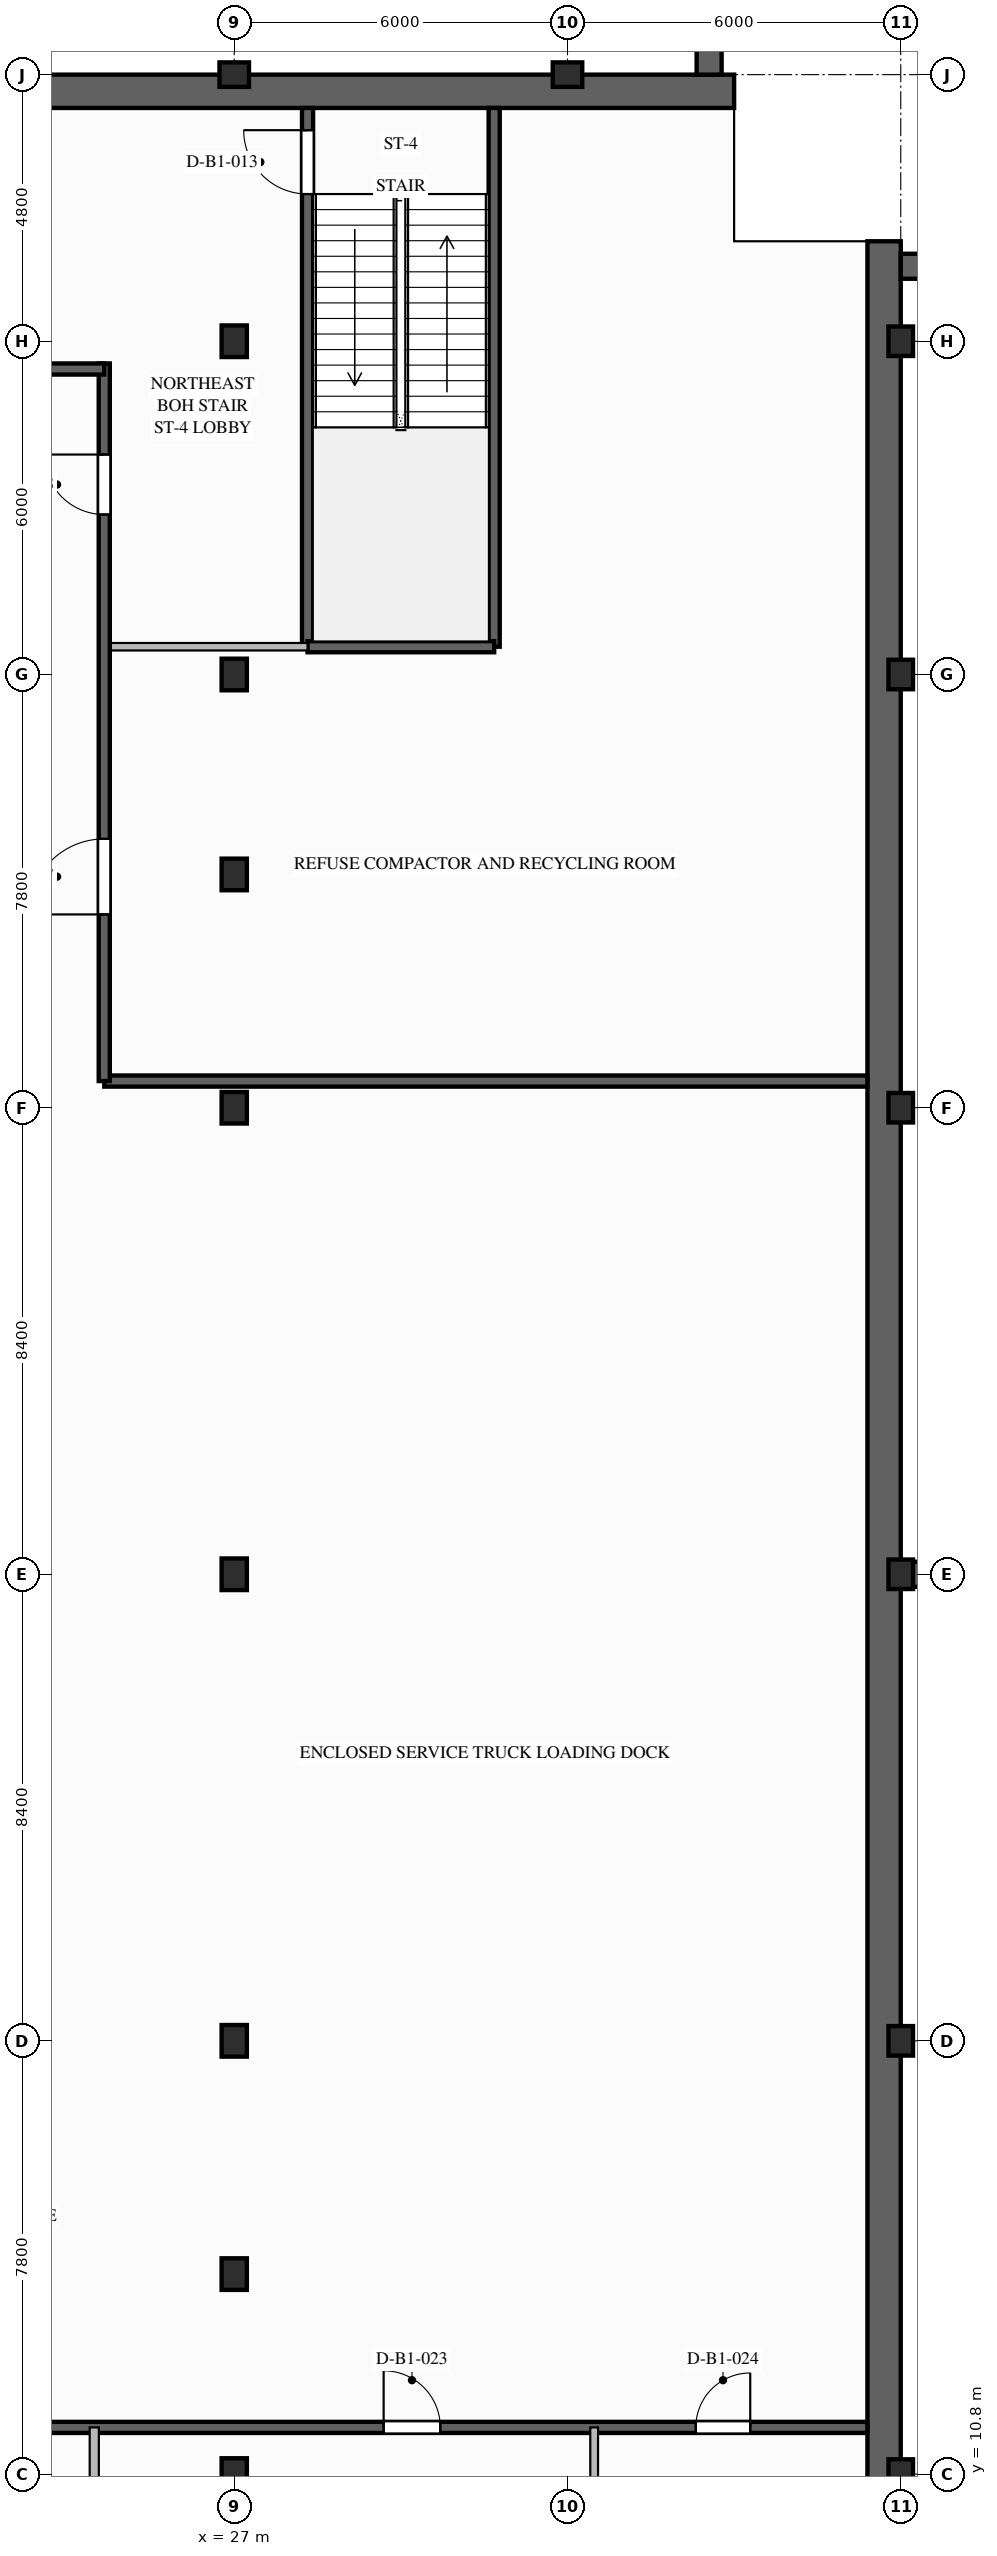
"""IFC4 building model, lengths in metres.
Left out: names, types, materials, properties, quantities, classifications, styles, units other than length and angle.
Written with IfcOpenShell. Run it as: python <this file> out.ifc"""

import sys

from ifc_helpers import new_model, si_unit, direction, frame, frame_2d, origin, origin_2d, place, context, subcontext, project, spatial, rectangle, i_section, extrude, element, fill, save


model = new_model("IFC4")
c1 = context("Model", 3, precision=1e-05, world=origin(), true_north=direction((0.0, 1.0)))
c2 = subcontext(c1, "Body", "Model", "MODEL_VIEW")
j1 = project(units=[si_unit("LENGTHUNIT", "METRE"), si_unit("PLANEANGLEUNIT", "RADIAN")], contexts=[c1])
p1 = place(None, origin())
s1 = spatial("IfcSite", under=j1, at=p1, CompositionType="ELEMENT")
p2 = place(p1, origin())
s2 = spatial("IfcBuilding", under=s1, at=p2, CompositionType="ELEMENT")
p3 = place(p2, frame((0.0, 0.0, -5.4)))
s3 = spatial("IfcBuildingStorey", under=s2, at=p3, CompositionType="ELEMENT", Elevation=-5.4)
p4 = place(p3, frame((-24.0, 53.7, 0.0), z_axis=(0.0, 0.0, 1.0), x_axis=(1.0, 0.0, 0.0)))
e1 = element("IfcWall", 1, at=p4, inside=s3, PredefinedType="USERDEFINED", context=c2, shape_type="SweptSolid", body=[
    extrude(rectangle(XDim=60.0, YDim=0.6, at=frame_2d((30.0, 0.0))), origin(), (0.0, 0.0, 1.0), 5.05),
])
p5 = place(p3, frame((38.7, 51.0, 0.0), z_axis=(0.0, 0.0, 1.0), x_axis=(0.0, -1.0, 0.0)))
e2 = element("IfcWall", 2, at=p5, inside=s3, PredefinedType="USERDEFINED", context=c2, shape_type="SweptSolid", body=[
    extrude(rectangle(XDim=48.0, YDim=0.6, at=frame_2d((24.0, 0.0))), origin(), (0.0, 0.0, 1.0), 5.05),
])
for number, where, z_axis, x_axis in (
    (3, (39.0, 10.8, 0.0), (0.0, 0.0, 1.0), (1.0, 0.0, 0.0)),
    (4, (39.0, 18.6, 0.0), (0.0, 0.0, 1.0), (1.0, 0.0, 0.0)),
    (5, (39.0, 27.0, 0.0), (0.0, 0.0, 1.0), (1.0, 0.0, 0.0)),
    (6, (39.0, 35.4, 0.0), (0.0, 0.0, 1.0), (1.0, 0.0, 0.0)),
    (7, (39.0, 43.2, 0.0), (0.0, 0.0, 1.0), (1.0, 0.0, 0.0)),
    (8, (39.0, 49.2, 0.0), (0.0, 0.0, 1.0), (1.0, 0.0, 0.0)),
    (9, (27.0, 54.0, 0.0), (0.0, 0.0, 1.0), (0.0, 1.0, 0.0)),
    (10, (33.0, 54.0, 0.0), (0.0, 0.0, 1.0), (0.0, 1.0, 0.0)),
):
    element("IfcColumn", number, at=place(p3, frame(where, z_axis=z_axis, x_axis=x_axis)), inside=s3, PredefinedType="COLUMN", context=c2, shape_type="SweptSolid", body=[
        extrude(i_section(OverallWidth=0.442, OverallDepth=0.531, WebThickness=0.066, FlangeThickness=0.106, FilletRadius=0.03, at=origin_2d()), origin(), (0.0, 0.0, 1.0), 5.4),
    ])
for number, where, z_axis, x_axis in (
    (11, (27.0, 10.8, 0.0), (0.0, 0.0, 1.0), (1.0, 0.0, 0.0)),
    (12, (27.0, 14.4, 0.0), (0.0, 0.0, 1.0), (1.0, 0.0, 0.0)),
    (13, (27.0, 39.6, 0.0), (0.0, 0.0, 1.0), (1.0, 0.0, 0.0)),
    (14, (27.0, 43.2, 0.0), (0.0, 0.0, 1.0), (1.0, 0.0, 0.0)),
    (15, (27.0, 49.2, 0.0), (0.0, 0.0, 1.0), (1.0, 0.0, 0.0)),
    (16, (27.0, 18.6, 0.0), (0.0, 0.0, 1.0), (1.0, 0.0, 0.0)),
    (17, (27.0, 27.0, 0.0), (0.0, 0.0, 1.0), (1.0, 0.0, 0.0)),
    (18, (27.0, 35.4, 0.0), (0.0, 0.0, 1.0), (1.0, 0.0, 0.0)),
):
    element("IfcColumn", number, at=place(p3, frame(where, z_axis=z_axis, x_axis=x_axis)), inside=s3, PredefinedType="COLUMN", context=c2, shape_type="SweptSolid", body=[
        extrude(i_section(OverallWidth=0.454, OverallDepth=0.569, WebThickness=0.078, FlangeThickness=0.125, FilletRadius=0.03, at=origin_2d()), origin(), (0.0, 0.0, 1.0), 5.4),
    ])
for number, where, z_axis, x_axis in (
    (19, (39.0, 27.0, -5.4), (0.0, 0.0, 1.0), (1.0, 0.0, 0.0)),
    (20, (39.0, 50.55, -5.4), (0.0, 0.0, 1.0), (1.0, 0.0, 0.0)),
):
    element("IfcWall", number, at=place(p3, frame(where, z_axis=z_axis, x_axis=x_axis)), inside=s3, PredefinedType="USERDEFINED", context=c2, shape_type="SweptSolid", body=[
        extrude(rectangle(XDim=5.825, YDim=0.45, at=frame_2d((2.913, 0.0))), origin(), (0.0, 0.0, 1.0), 10.62),
    ])
p6 = place(p3, frame((35.55, 54.0, -5.4), z_axis=(0.0, 0.0, 1.0), x_axis=(0.0, 1.0, 0.0)))
e21 = element("IfcWall", 21, at=p6, inside=s3, PredefinedType="USERDEFINED", context=c2, shape_type="SweptSolid", body=[
    extrude(rectangle(XDim=2.325, YDim=0.45, at=frame_2d((1.163, 0.0))), origin(), (0.0, 0.0, 1.0), 10.62),
])
p7 = place(p3, frame((28.32, 43.7, 0.0), z_axis=(0.0, 0.0, 1.0), x_axis=(0.0, 1.0, 0.0)))
e22 = element("IfcWall", 22, at=p7, inside=s3, PredefinedType="SOLIDWALL", context=c2, shape_type="SweptSolid", body=[
    extrude(rectangle(XDim=9.7, YDim=0.2, at=frame_2d((4.85, 0.0))), origin(), (0.0, 0.0, 1.0), 5.05),
])
p8 = place(p7, frame((8.15, 0.0, 0.0)))
e23 = element("IfcOpeningElement", 23, at=p8, cuts=e22, PredefinedType="OPENING", context=c2, shape_type="SweptSolid", body=[
    extrude(rectangle(XDim=1.15, YDim=2.15, at=frame_2d((0.575, 1.075))), frame((0.0, 0.11, 0.0), z_axis=(0.0, -1.0, 0.0), x_axis=(1.0, 0.0, 0.0)), (0.0, 0.0, 1.0), 0.22),
])
p9 = place(p3, frame((31.68, 53.4, 0.0), z_axis=(0.0, 0.0, 1.0), x_axis=(0.0, -1.0, 0.0)))
e24 = element("IfcWall", 24, at=p9, inside=s3, PredefinedType="SOLIDWALL", context=c2, shape_type="SweptSolid", body=[
    extrude(rectangle(XDim=9.7, YDim=0.2, at=frame_2d((4.85, 0.0))), origin(), (0.0, 0.0, 1.0), 5.05),
])
p10 = place(p3, frame((28.32, 43.7, 0.0), z_axis=(0.0, 0.0, 1.0), x_axis=(1.0, 0.0, 0.0)))
e25 = element("IfcWall", 25, at=p10, inside=s3, PredefinedType="SOLIDWALL", context=c2, shape_type="SweptSolid", body=[
    extrude(rectangle(XDim=3.36, YDim=0.2, at=frame_2d((1.68, 0.0))), origin(), (0.0, 0.0, 1.0), 5.05),
])
p11 = place(p3, frame((-21.1, 11.64, 0.0), z_axis=(0.0, 0.0, 1.0), x_axis=(1.0, 0.0, 0.0)))
e26 = element("IfcWall", 26, at=p11, inside=s3, PredefinedType="SOLIDWALL", context=c2, shape_type="SweptSolid", body=[
    extrude(rectangle(XDim=59.5, YDim=0.2, at=frame_2d((29.75, 0.0))), origin(), (0.0, 0.0, 1.0), 5.05),
])
p12 = place(p11, frame((6.36, 0.0, 0.0)))
e27 = element("IfcOpeningElement", 27, at=p12, cuts=e26, PredefinedType="OPENING", context=c2, shape_type="SweptSolid", body=[
    extrude(rectangle(XDim=1.08, YDim=2.04, at=frame_2d((0.54, 1.02))), frame((0.0, 0.11, 0.0), z_axis=(0.0, -1.0, 0.0), x_axis=(1.0, 0.0, 0.0)), (0.0, 0.0, 1.0), 0.22),
])
p13 = place(p11, frame((18.42, 0.0, 0.0)))
e28 = element("IfcOpeningElement", 28, at=p13, cuts=e26, PredefinedType="OPENING", context=c2, shape_type="SweptSolid", body=[
    extrude(rectangle(XDim=1.36, YDim=2.2, at=frame_2d((0.68, 1.1))), frame((0.0, 0.11, 0.0), z_axis=(0.0, -1.0, 0.0), x_axis=(1.0, 0.0, 0.0)), (0.0, 0.0, 1.0), 0.22),
])
p14 = place(p11, frame((32.72, 0.0, 0.0)))
e29 = element("IfcOpeningElement", 29, at=p14, cuts=e26, PredefinedType="OPENING", context=c2, shape_type="SweptSolid", body=[
    extrude(rectangle(XDim=1.36, YDim=2.2, at=frame_2d((0.68, 1.1))), frame((0.0, 0.11, 0.0), z_axis=(0.0, -1.0, 0.0), x_axis=(1.0, 0.0, 0.0)), (0.0, 0.0, 1.0), 0.22),
])
p15 = place(p11, frame((50.79, 0.0, 0.0)))
e30 = element("IfcOpeningElement", 30, at=p15, cuts=e26, PredefinedType="OPENING", context=c2, shape_type="SweptSolid", body=[
    extrude(rectangle(XDim=1.02, YDim=2.15, at=frame_2d((0.51, 1.075))), frame((0.0, 0.11, 0.0), z_axis=(0.0, -1.0, 0.0), x_axis=(1.0, 0.0, 0.0)), (0.0, 0.0, 1.0), 0.22),
])
p16 = place(p11, frame((56.41, 0.0, 0.0)))
e31 = element("IfcOpeningElement", 31, at=p16, cuts=e26, PredefinedType="OPENING", context=c2, shape_type="SweptSolid", body=[
    extrude(rectangle(XDim=0.98, YDim=2.1, at=frame_2d((0.49, 1.05))), frame((0.0, 0.11, 0.0), z_axis=(0.0, -1.0, 0.0), x_axis=(1.0, 0.0, 0.0)), (0.0, 0.0, 1.0), 0.22),
])
p17 = place(p3, frame((24.48, 0.6, 0.0), z_axis=(0.0, 0.0, 1.0), x_axis=(0.0, 1.0, 0.0)))
e32 = element("IfcWall", 32, at=p17, inside=s3, PredefinedType="PARTITIONING", context=c2, shape_type="SweptSolid", body=[
    extrude(rectangle(XDim=11.04, YDim=0.165, at=frame_2d((5.52, 0.0))), origin(), (0.0, 0.0, 1.0), 5.05),
])
p18 = place(p3, frame((33.48, 0.6, 0.0), z_axis=(0.0, 0.0, 1.0), x_axis=(0.0, 1.0, 0.0)))
e33 = element("IfcWall", 33, at=p18, inside=s3, PredefinedType="PLUMBINGWALL", context=c2, shape_type="SweptSolid", body=[
    extrude(rectangle(XDim=11.04, YDim=0.14, at=frame_2d((5.52, 0.0))), origin(), (0.0, 0.0, 1.0), 5.05),
])
p19 = place(p18, frame((2.2, 0.0, 0.0)))
e34 = element("IfcOpeningElement", 34, at=p19, cuts=e33, PredefinedType="OPENING", context=c2, shape_type="SweptSolid", body=[
    extrude(rectangle(XDim=0.92, YDim=2.1, at=frame_2d((0.46, 1.05))), frame((0.0, 0.08, 0.0), z_axis=(0.0, -1.0, 0.0), x_axis=(1.0, 0.0, 0.0)), (0.0, 0.0, 1.0), 0.16),
])
p20 = place(p3, frame((24.66, 35.88, 0.0), z_axis=(0.0, 0.0, 1.0), x_axis=(1.0, 0.0, 0.0)))
e35 = element("IfcWall", 35, at=p20, inside=s3, PredefinedType="SOLIDWALL", context=c2, shape_type="SweptSolid", body=[
    extrude(rectangle(XDim=13.74, YDim=0.2, at=frame_2d((6.87, 0.0))), origin(), (0.0, 0.0, 1.0), 5.05),
])
p21 = place(p3, frame((24.66, 43.7, 0.0), z_axis=(0.0, 0.0, 1.0), x_axis=(1.0, 0.0, 0.0)))
e36 = element("IfcWall", 36, at=p21, inside=s3, PredefinedType="PARTITIONING", context=c2, shape_type="SweptSolid", body=[
    extrude(rectangle(XDim=3.66, YDim=0.135, at=frame_2d((1.83, 0.0))), origin(), (0.0, 0.0, 1.0), 5.05),
])
p22 = place(p3, frame((24.66, 35.88, 0.0), z_axis=(0.0, 0.0, 1.0), x_axis=(0.0, 1.0, 0.0)))
e37 = element("IfcWall", 37, at=p22, inside=s3, PredefinedType="SOLIDWALL", context=c2, shape_type="SweptSolid", body=[
    extrude(rectangle(XDim=12.92, YDim=0.2, at=frame_2d((6.46, 0.0))), origin(), (0.0, 0.0, 1.0), 5.05),
])
p23 = place(p22, frame((3.0, 0.0, 0.0)))
e38 = element("IfcOpeningElement", 38, at=p23, cuts=e37, PredefinedType="OPENING", context=c2, shape_type="SweptSolid", body=[
    extrude(rectangle(XDim=1.36, YDim=2.2, at=frame_2d((0.68, 1.1))), frame((0.0, 0.11, 0.0), z_axis=(0.0, -1.0, 0.0), x_axis=(1.0, 0.0, 0.0)), (0.0, 0.0, 1.0), 0.22),
])
p24 = place(p22, frame((10.2, 0.0, 0.0)))
e39 = element("IfcOpeningElement", 39, at=p24, cuts=e37, PredefinedType="OPENING", context=c2, shape_type="SweptSolid", body=[
    extrude(rectangle(XDim=1.08, YDim=2.04, at=frame_2d((0.54, 1.02))), frame((0.0, 0.11, 0.0), z_axis=(0.0, -1.0, 0.0), x_axis=(1.0, 0.0, 0.0)), (0.0, 0.0, 1.0), 0.22),
])
p25 = place(p3, frame((-26.4, 48.7, 0.0), z_axis=(0.0, 0.0, 1.0), x_axis=(1.0, 0.0, 0.0)))
e40 = element("IfcWall", 40, at=p25, inside=s3, PredefinedType="SOLIDWALL", context=c2, shape_type="SweptSolid", body=[
    extrude(rectangle(XDim=51.06, YDim=0.2, at=frame_2d((25.53, 0.0))), origin(), (0.0, 0.0, 1.0), 5.05),
])
p26 = place(p8, origin())
e41 = element("IfcDoor", 41, at=p26, inside=s3, OperationType="SINGLE_SWING_RIGHT", PredefinedType="DOOR", context=c2, shape_type="SweptSolid", body=[
    extrude(rectangle(XDim=1.15, YDim=2.15, at=frame_2d((0.575, 1.075))), frame((0.0, 0.025, 0.0), z_axis=(0.0, -1.0, 0.0), x_axis=(1.0, 0.0, 0.0)), (0.0, 0.0, 1.0), 0.05),
])
fill(e23, e41)
p27 = place(p15, origin())
e42 = element("IfcDoor", 42, at=p27, inside=s3, OperationType="SINGLE_SWING_LEFT", PredefinedType="DOOR", context=c2, shape_type="SweptSolid", body=[
    extrude(rectangle(XDim=1.02, YDim=2.15, at=frame_2d((0.51, 1.075))), frame((0.0, 0.025, 0.0), z_axis=(0.0, -1.0, 0.0), x_axis=(1.0, 0.0, 0.0)), (0.0, 0.0, 1.0), 0.05),
])
fill(e30, e42)
p28 = place(p16, origin())
e43 = element("IfcDoor", 43, at=p28, inside=s3, OperationType="SINGLE_SWING_RIGHT", PredefinedType="DOOR", context=c2, shape_type="SweptSolid", body=[
    extrude(rectangle(XDim=0.98, YDim=2.1, at=frame_2d((0.49, 1.05))), frame((0.0, 0.025, 0.0), z_axis=(0.0, -1.0, 0.0), x_axis=(1.0, 0.0, 0.0)), (0.0, 0.0, 1.0), 0.05),
])
fill(e31, e43)
p29 = place(p23, origin())
e44 = element("IfcDoor", 44, at=p29, inside=s3, OperationType="SINGLE_SWING_LEFT", PredefinedType="DOOR", context=c2, shape_type="SweptSolid", body=[
    extrude(rectangle(XDim=1.36, YDim=2.2, at=frame_2d((0.68, 1.1))), frame((0.0, 0.025, 0.0), z_axis=(0.0, -1.0, 0.0), x_axis=(1.0, 0.0, 0.0)), (0.0, 0.0, 1.0), 0.05),
])
fill(e38, e44)
p30 = place(p24, origin())
e45 = element("IfcDoor", 45, at=p30, inside=s3, OperationType="SINGLE_SWING_RIGHT", PredefinedType="DOOR", context=c2, shape_type="SweptSolid", body=[
    extrude(rectangle(XDim=1.08, YDim=2.04, at=frame_2d((0.54, 1.02))), frame((0.0, 0.025, 0.0), z_axis=(0.0, -1.0, 0.0), x_axis=(1.0, 0.0, 0.0)), (0.0, 0.0, 1.0), 0.05),
])
fill(e39, e45)
save(model, sys.argv[1])
